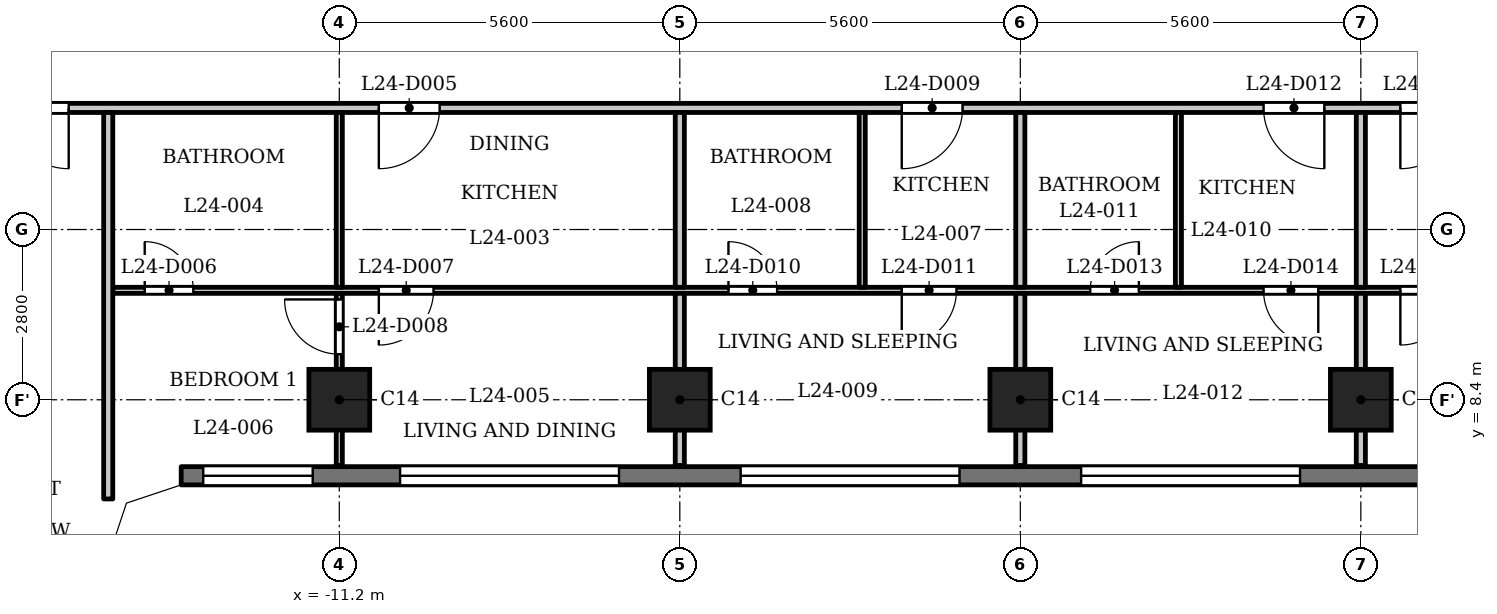
"""IFC4 building model, lengths in metres.
Left out: names, types, materials, properties, quantities, classifications, styles, units other than length and angle.
Written with IfcOpenShell. Run it as: python <this file> out.ifc"""

import sys

from ifc_helpers import new_model, si_unit, direction, frame, frame_2d, origin, origin_2d, place, context, subcontext, project, spatial, polyline, rectangle, outline, extrude, element, fill, save


model = new_model("IFC4")
c1 = context("Model", 3, precision=1e-05, world=origin(), true_north=direction((0.0, 1.0)))
c2 = subcontext(c1, "Body", "Model", "MODEL_VIEW")
j1 = project(units=[si_unit("LENGTHUNIT", "METRE"), si_unit("PLANEANGLEUNIT", "RADIAN")], contexts=[c1])
p1 = place(None, origin())
s1 = spatial("IfcSite", under=j1, at=p1, CompositionType="ELEMENT")
p2 = place(p1, origin())
s2 = spatial("IfcBuilding", under=s1, at=p2, CompositionType="ELEMENT")
p3 = place(p2, frame((0.0, 0.0, 97.3)))
s3 = spatial("IfcBuildingStorey", under=s2, at=p3, CompositionType="ELEMENT", Elevation=97.3)
for number, where, z_axis, x_axis in (
    (1, (-11.2, 8.4, 0.0), (0.0, 0.0, 1.0), (1.0, 0.0, 0.0)),
    (2, (-5.6, 8.4, 0.0), (0.0, 0.0, 1.0), (1.0, 0.0, 0.0)),
    (3, (0.0, 8.4, 0.0), (0.0, 0.0, 1.0), (1.0, 0.0, 0.0)),
    (4, (5.6, 8.4, 0.0), (0.0, 0.0, 1.0), (1.0, 0.0, 0.0)),
):
    element("IfcColumn", number, at=place(p3, frame(where, z_axis=z_axis, x_axis=x_axis)), inside=s3, PredefinedType="COLUMN", context=c2, shape_type="SweptSolid", body=[
        extrude(rectangle(XDim=1.0, YDim=1.0, at=origin_2d()), origin(), (0.0, 0.0, 1.0), 3.5),
    ])
p4 = place(p3, frame((-13.8, 7.15, 0.0), z_axis=(0.0, 0.0, 1.0), x_axis=(1.0, 0.0, 0.0)))
e5 = element("IfcWall", 5, at=p4, inside=s3, PredefinedType="SOLIDWALL", context=c2, shape_type="SweptSolid", body=[
    extrude(rectangle(XDim=27.6, YDim=0.3, at=frame_2d((13.8, 0.0))), origin(), (0.0, 0.0, 1.0), 3.2),
])
p5 = place(p4, frame((0.363, 0.0, 0.9)))
e6 = element("IfcOpeningElement", 6, at=p5, cuts=e5, PredefinedType="OPENING", context=c2, shape_type="SweptSolid", body=[
    extrude(rectangle(XDim=1.8, YDim=1.25, at=frame_2d((0.9, 0.625))), frame((0.0, 0.16, 0.0), z_axis=(0.0, -1.0, 0.0), x_axis=(1.0, 0.0, 0.0)), (0.0, 0.0, 1.0), 0.32),
])
p6 = place(p4, frame((3.6, 0.0, 1.2)))
e7 = element("IfcOpeningElement", 7, at=p6, cuts=e5, PredefinedType="OPENING", context=c2, shape_type="SweptSolid", body=[
    extrude(rectangle(XDim=3.6, YDim=0.95, at=frame_2d((1.8, 0.475))), frame((0.0, 0.16, 0.0), z_axis=(0.0, -1.0, 0.0), x_axis=(1.0, 0.0, 0.0)), (0.0, 0.0, 1.0), 0.32),
])
p7 = place(p4, frame((9.2, 0.0, 1.2)))
e8 = element("IfcOpeningElement", 8, at=p7, cuts=e5, PredefinedType="OPENING", context=c2, shape_type="SweptSolid", body=[
    extrude(rectangle(XDim=3.6, YDim=0.95, at=frame_2d((1.8, 0.475))), frame((0.0, 0.16, 0.0), z_axis=(0.0, -1.0, 0.0), x_axis=(1.0, 0.0, 0.0)), (0.0, 0.0, 1.0), 0.32),
])
p8 = place(p4, frame((14.8, 0.0, 1.2)))
e9 = element("IfcOpeningElement", 9, at=p8, cuts=e5, PredefinedType="OPENING", context=c2, shape_type="SweptSolid", body=[
    extrude(rectangle(XDim=3.6, YDim=0.95, at=frame_2d((1.8, 0.475))), frame((0.0, 0.16, 0.0), z_axis=(0.0, -1.0, 0.0), x_axis=(1.0, 0.0, 0.0)), (0.0, 0.0, 1.0), 0.32),
])
p9 = place(p4, frame((20.4, 0.0, 1.2)))
e10 = element("IfcOpeningElement", 10, at=p9, cuts=e5, PredefinedType="OPENING", context=c2, shape_type="SweptSolid", body=[
    extrude(rectangle(XDim=3.6, YDim=0.95, at=frame_2d((1.8, 0.475))), frame((0.0, 0.16, 0.0), z_axis=(0.0, -1.0, 0.0), x_axis=(1.0, 0.0, 0.0)), (0.0, 0.0, 1.0), 0.32),
])
p10 = place(p4, frame((25.438, 0.0, 0.9)))
e11 = element("IfcOpeningElement", 11, at=p10, cuts=e5, PredefinedType="OPENING", context=c2, shape_type="SweptSolid", body=[
    extrude(rectangle(XDim=1.8, YDim=1.25, at=frame_2d((0.9, 0.625))), frame((0.0, 0.16, 0.0), z_axis=(0.0, -1.0, 0.0), x_axis=(1.0, 0.0, 0.0)), (0.0, 0.0, 1.0), 0.32),
])
p11 = place(p3, frame((-14.925, 10.2, 0.0), z_axis=(0.0, 0.0, 1.0), x_axis=(1.0, 0.0, 0.0)))
e12 = element("IfcWall", 12, at=p11, inside=s3, PredefinedType="PARTITIONING", context=c2, shape_type="SweptSolid", body=[
    extrude(rectangle(XDim=29.85, YDim=0.1, at=frame_2d((14.925, 0.0))), origin(), (0.0, 0.0, 1.0), 3.2),
])
p12 = place(p11, frame((0.525, 0.0, 0.0)))
e13 = element("IfcOpeningElement", 13, at=p12, cuts=e12, PredefinedType="OPENING", context=c2, shape_type="SweptSolid", body=[
    extrude(rectangle(XDim=0.8, YDim=2.1, at=frame_2d((0.4, 1.05))), frame((0.0, 0.06, 0.0), z_axis=(0.0, -1.0, 0.0), x_axis=(1.0, 0.0, 0.0)), (0.0, 0.0, 1.0), 0.12),
])
p13 = place(p11, frame((4.375, 0.0, 0.0)))
e14 = element("IfcOpeningElement", 14, at=p13, cuts=e12, PredefinedType="OPENING", context=c2, shape_type="SweptSolid", body=[
    extrude(rectangle(XDim=0.9, YDim=2.1, at=frame_2d((0.45, 1.05))), frame((0.0, 0.06, 0.0), z_axis=(0.0, -1.0, 0.0), x_axis=(1.0, 0.0, 0.0)), (0.0, 0.0, 1.0), 0.12),
])
p14 = place(p11, frame((10.125, 0.0, 0.0)))
e15 = element("IfcOpeningElement", 15, at=p14, cuts=e12, PredefinedType="OPENING", context=c2, shape_type="SweptSolid", body=[
    extrude(rectangle(XDim=0.8, YDim=2.1, at=frame_2d((0.4, 1.05))), frame((0.0, 0.06, 0.0), z_axis=(0.0, -1.0, 0.0), x_axis=(1.0, 0.0, 0.0)), (0.0, 0.0, 1.0), 0.12),
])
p15 = place(p11, frame((12.975, 0.0, 0.0)))
e16 = element("IfcOpeningElement", 16, at=p15, cuts=e12, PredefinedType="OPENING", context=c2, shape_type="SweptSolid", body=[
    extrude(rectangle(XDim=0.9, YDim=2.1, at=frame_2d((0.45, 1.05))), frame((0.0, 0.06, 0.0), z_axis=(0.0, -1.0, 0.0), x_axis=(1.0, 0.0, 0.0)), (0.0, 0.0, 1.0), 0.12),
])
p16 = place(p11, frame((16.075, 0.0, 0.0)))
e17 = element("IfcOpeningElement", 17, at=p16, cuts=e12, PredefinedType="OPENING", context=c2, shape_type="SweptSolid", body=[
    extrude(rectangle(XDim=0.8, YDim=2.1, at=frame_2d((0.4, 1.05))), frame((0.0, 0.06, 0.0), z_axis=(0.0, -1.0, 0.0), x_axis=(1.0, 0.0, 0.0)), (0.0, 0.0, 1.0), 0.12),
])
p17 = place(p11, frame((18.925, 0.0, 0.0)))
e18 = element("IfcOpeningElement", 18, at=p17, cuts=e12, PredefinedType="OPENING", context=c2, shape_type="SweptSolid", body=[
    extrude(rectangle(XDim=0.9, YDim=2.1, at=frame_2d((0.45, 1.05))), frame((0.0, 0.06, 0.0), z_axis=(0.0, -1.0, 0.0), x_axis=(1.0, 0.0, 0.0)), (0.0, 0.0, 1.0), 0.12),
])
p18 = place(p11, frame((26.975, 0.0, 0.0)))
e19 = element("IfcOpeningElement", 19, at=p18, cuts=e12, PredefinedType="OPENING", context=c2, shape_type="SweptSolid", body=[
    extrude(rectangle(XDim=0.8, YDim=2.1, at=frame_2d((0.4, 1.05))), frame((0.0, 0.06, 0.0), z_axis=(0.0, -1.0, 0.0), x_axis=(1.0, 0.0, 0.0)), (0.0, 0.0, 1.0), 0.12),
])
p19 = place(p11, frame((21.175, 0.0, 0.0)))
e20 = element("IfcOpeningElement", 20, at=p19, cuts=e12, PredefinedType="OPENING", context=c2, shape_type="SweptSolid", body=[
    extrude(rectangle(XDim=0.9, YDim=2.1, at=frame_2d((0.45, 1.05))), frame((0.0, 0.06, 0.0), z_axis=(0.0, -1.0, 0.0), x_axis=(1.0, 0.0, 0.0)), (0.0, 0.0, 1.0), 0.12),
])
p20 = place(p3, frame((-17.4, 13.2, 0.0), z_axis=(0.0, 0.0, 1.0), x_axis=(1.0, 0.0, 0.0)))
e21 = element("IfcWall", 21, at=p20, inside=s3, PredefinedType="PARTITIONING", context=c2, shape_type="SweptSolid", body=[
    extrude(rectangle(XDim=34.8, YDim=0.15, at=frame_2d((17.4, 0.0))), origin(), (0.0, 0.0, 1.0), 3.2),
])
p21 = place(p20, frame((0.75, 0.0, 0.0)))
e22 = element("IfcOpeningElement", 22, at=p21, cuts=e21, PredefinedType="OPENING", context=c2, shape_type="SweptSolid", body=[
    extrude(rectangle(XDim=1.0, YDim=2.1, at=frame_2d((0.5, 1.05))), frame((0.0, 0.085, 0.0), z_axis=(0.0, -1.0, 0.0), x_axis=(1.0, 0.0, 0.0)), (0.0, 0.0, 1.0), 0.17),
])
p22 = place(p20, frame((33.15, 0.0, 0.0)))
e23 = element("IfcOpeningElement", 23, at=p22, cuts=e21, PredefinedType="OPENING", context=c2, shape_type="SweptSolid", body=[
    extrude(rectangle(XDim=1.0, YDim=2.1, at=frame_2d((0.5, 1.05))), frame((0.0, 0.085, 0.0), z_axis=(0.0, -1.0, 0.0), x_axis=(1.0, 0.0, 0.0)), (0.0, 0.0, 1.0), 0.17),
])
p23 = place(p20, frame((6.85, 0.0, 0.0)))
e24 = element("IfcOpeningElement", 24, at=p23, cuts=e21, PredefinedType="OPENING", context=c2, shape_type="SweptSolid", body=[
    extrude(rectangle(XDim=1.0, YDim=2.1, at=frame_2d((0.5, 1.05))), frame((0.0, 0.085, 0.0), z_axis=(0.0, -1.0, 0.0), x_axis=(1.0, 0.0, 0.0)), (0.0, 0.0, 1.0), 0.17),
])
p24 = place(p20, frame((15.45, 0.0, 0.0)))
e25 = element("IfcOpeningElement", 25, at=p24, cuts=e21, PredefinedType="OPENING", context=c2, shape_type="SweptSolid", body=[
    extrude(rectangle(XDim=1.0, YDim=2.1, at=frame_2d((0.5, 1.05))), frame((0.0, 0.085, 0.0), z_axis=(0.0, -1.0, 0.0), x_axis=(1.0, 0.0, 0.0)), (0.0, 0.0, 1.0), 0.17),
])
p25 = place(p20, frame((21.4, 0.0, 0.0)))
e26 = element("IfcOpeningElement", 26, at=p25, cuts=e21, PredefinedType="OPENING", context=c2, shape_type="SweptSolid", body=[
    extrude(rectangle(XDim=1.0, YDim=2.1, at=frame_2d((0.5, 1.05))), frame((0.0, 0.085, 0.0), z_axis=(0.0, -1.0, 0.0), x_axis=(1.0, 0.0, 0.0)), (0.0, 0.0, 1.0), 0.17),
])
p26 = place(p20, frame((23.65, 0.0, 0.0)))
e27 = element("IfcOpeningElement", 27, at=p26, cuts=e21, PredefinedType="OPENING", context=c2, shape_type="SweptSolid", body=[
    extrude(rectangle(XDim=1.0, YDim=2.1, at=frame_2d((0.5, 1.05))), frame((0.0, 0.085, 0.0), z_axis=(0.0, -1.0, 0.0), x_axis=(1.0, 0.0, 0.0)), (0.0, 0.0, 1.0), 0.17),
])
p27 = place(p3, frame((-15.0, 6.769, 0.0), z_axis=(0.0, 0.0, 1.0), x_axis=(0.0, 1.0, 0.0)))
e28 = element("IfcWall", 28, at=p27, inside=s3, PredefinedType="PARTITIONING", context=c2, shape_type="SweptSolid", body=[
    extrude(rectangle(XDim=6.356, YDim=0.15, at=frame_2d((3.178, 0.0))), origin(), (0.0, 0.0, 1.0), 3.2),
])
p28 = place(p3, frame((-11.2, 7.32, 0.0), z_axis=(0.0, 0.0, 1.0), x_axis=(0.0, 1.0, 0.0)))
e29 = element("IfcWall", 29, at=p28, inside=s3, PredefinedType="PARTITIONING", context=c2, shape_type="SweptSolid", body=[
    extrude(rectangle(XDim=2.83, YDim=0.1, at=frame_2d((1.415, 0.0))), origin(), (0.0, 0.0, 1.0), 3.2),
])
p29 = place(p28, frame((1.83, 0.0, 0.0)))
e30 = element("IfcOpeningElement", 30, at=p29, cuts=e29, PredefinedType="OPENING", context=c2, shape_type="SweptSolid", body=[
    extrude(rectangle(XDim=0.9, YDim=2.1, at=frame_2d((0.45, 1.05))), frame((0.0, 0.06, 0.0), z_axis=(0.0, -1.0, 0.0), x_axis=(1.0, 0.0, 0.0)), (0.0, 0.0, 1.0), 0.12),
])
p30 = place(p3, frame((-11.2, 10.25, 0.0), z_axis=(0.0, 0.0, 1.0), x_axis=(0.0, 1.0, 0.0)))
e31 = element("IfcWall", 31, at=p30, inside=s3, PredefinedType="PARTITIONING", context=c2, shape_type="SweptSolid", body=[
    extrude(rectangle(XDim=2.875, YDim=0.1, at=frame_2d((1.438, 0.0))), origin(), (0.0, 0.0, 1.0), 3.2),
])
p31 = place(p3, frame((-5.6, 7.32, 0.0), z_axis=(0.0, 0.0, 1.0), x_axis=(0.0, 1.0, 0.0)))
e32 = element("IfcWall", 32, at=p31, inside=s3, PredefinedType="PARTITIONING", context=c2, shape_type="SweptSolid", body=[
    extrude(rectangle(XDim=2.83, YDim=0.15, at=frame_2d((1.415, 0.0))), origin(), (0.0, 0.0, 1.0), 3.2),
])
p32 = place(p3, frame((-5.6, 10.25, 0.0), z_axis=(0.0, 0.0, 1.0), x_axis=(0.0, 1.0, 0.0)))
e33 = element("IfcWall", 33, at=p32, inside=s3, PredefinedType="PARTITIONING", context=c2, shape_type="SweptSolid", body=[
    extrude(rectangle(XDim=2.875, YDim=0.15, at=frame_2d((1.438, 0.0))), origin(), (0.0, 0.0, 1.0), 3.2),
])
p33 = place(p3, frame((-2.6, 10.25, 0.0), z_axis=(0.0, 0.0, 1.0), x_axis=(0.0, 1.0, 0.0)))
e34 = element("IfcWall", 34, at=p33, inside=s3, PredefinedType="PARTITIONING", context=c2, shape_type="SweptSolid", body=[
    extrude(rectangle(XDim=2.875, YDim=0.1, at=frame_2d((1.438, 0.0))), origin(), (0.0, 0.0, 1.0), 3.2),
])
p34 = place(p3, frame((0.0, 7.32, 0.0), z_axis=(0.0, 0.0, 1.0), x_axis=(0.0, 1.0, 0.0)))
e35 = element("IfcWall", 35, at=p34, inside=s3, PredefinedType="PARTITIONING", context=c2, shape_type="SweptSolid", body=[
    extrude(rectangle(XDim=2.83, YDim=0.15, at=frame_2d((1.415, 0.0))), origin(), (0.0, 0.0, 1.0), 3.2),
])
p35 = place(p3, frame((0.0, 10.25, 0.0), z_axis=(0.0, 0.0, 1.0), x_axis=(0.0, 1.0, 0.0)))
e36 = element("IfcWall", 36, at=p35, inside=s3, PredefinedType="PARTITIONING", context=c2, shape_type="SweptSolid", body=[
    extrude(rectangle(XDim=2.875, YDim=0.15, at=frame_2d((1.438, 0.0))), origin(), (0.0, 0.0, 1.0), 3.2),
])
p36 = place(p3, frame((2.6, 10.25, 0.0), z_axis=(0.0, 0.0, 1.0), x_axis=(0.0, 1.0, 0.0)))
e37 = element("IfcWall", 37, at=p36, inside=s3, PredefinedType="PARTITIONING", context=c2, shape_type="SweptSolid", body=[
    extrude(rectangle(XDim=2.875, YDim=0.1, at=frame_2d((1.438, 0.0))), origin(), (0.0, 0.0, 1.0), 3.2),
])
p37 = place(p3, frame((5.6, 7.32, 0.0), z_axis=(0.0, 0.0, 1.0), x_axis=(0.0, 1.0, 0.0)))
e38 = element("IfcWall", 38, at=p37, inside=s3, PredefinedType="PARTITIONING", context=c2, shape_type="SweptSolid", body=[
    extrude(rectangle(XDim=2.83, YDim=0.15, at=frame_2d((1.415, 0.0))), origin(), (0.0, 0.0, 1.0), 3.2),
])
p38 = place(p3, frame((5.6, 10.25, 0.0), z_axis=(0.0, 0.0, 1.0), x_axis=(0.0, 1.0, 0.0)))
e39 = element("IfcWall", 39, at=p38, inside=s3, PredefinedType="PARTITIONING", context=c2, shape_type="SweptSolid", body=[
    extrude(rectangle(XDim=2.875, YDim=0.15, at=frame_2d((1.438, 0.0))), origin(), (0.0, 0.0, 1.0), 3.2),
])
p39 = place(p3, origin())
e40 = element("IfcWall", 40, at=p39, inside=s3, PredefinedType="SOLIDWALL", context=c2, shape_type="SweptSolid", body=[
    extrude(outline(polyline([(-13.849, 7.3), (-14.937, 6.937), (-15.3, 5.849), (-15.3, 5.8), (-15.0, 5.8), (-14.7, 6.7), (-13.8, 7.0), (-13.8, 7.3), (-13.849, 7.3)])), origin(), (0.0, 0.0, 1.0), 3.2),
])
p40 = place(p21, origin())
e41 = element("IfcDoor", 41, at=p40, inside=s3, OperationType="SINGLE_SWING_RIGHT", PredefinedType="DOOR", context=c2, shape_type="SweptSolid", body=[
    extrude(rectangle(XDim=1.0, YDim=2.1, at=frame_2d((0.5, 1.05))), frame((0.0, 0.025, 0.0), z_axis=(0.0, -1.0, 0.0), x_axis=(1.0, 0.0, 0.0)), (0.0, 0.0, 1.0), 0.05),
])
fill(e22, e41)
p41 = place(p23, origin())
e42 = element("IfcDoor", 42, at=p41, inside=s3, OperationType="SINGLE_SWING_LEFT", PredefinedType="DOOR", context=c2, shape_type="SweptSolid", body=[
    extrude(rectangle(XDim=1.0, YDim=2.1, at=frame_2d((0.5, 1.05))), frame((0.0, 0.025, 0.0), z_axis=(0.0, -1.0, 0.0), x_axis=(1.0, 0.0, 0.0)), (0.0, 0.0, 1.0), 0.05),
])
fill(e24, e42)
p42 = place(p12, origin())
e43 = element("IfcDoor", 43, at=p42, inside=s3, OperationType="SINGLE_SWING_RIGHT", PredefinedType="DOOR", context=c2, shape_type="SweptSolid", body=[
    extrude(rectangle(XDim=0.8, YDim=2.1, at=frame_2d((0.4, 1.05))), frame((0.0, 0.025, 0.0), z_axis=(0.0, -1.0, 0.0), x_axis=(1.0, 0.0, 0.0)), (0.0, 0.0, 1.0), 0.05),
])
fill(e13, e43)
p43 = place(p13, origin())
e44 = element("IfcDoor", 44, at=p43, inside=s3, OperationType="SINGLE_SWING_LEFT", PredefinedType="DOOR", context=c2, shape_type="SweptSolid", body=[
    extrude(rectangle(XDim=0.9, YDim=2.1, at=frame_2d((0.45, 1.05))), frame((0.0, 0.025, 0.0), z_axis=(0.0, -1.0, 0.0), x_axis=(1.0, 0.0, 0.0)), (0.0, 0.0, 1.0), 0.05),
])
fill(e14, e44)
p44 = place(p29, origin())
e45 = element("IfcDoor", 45, at=p44, inside=s3, OperationType="SINGLE_SWING_LEFT", PredefinedType="DOOR", context=c2, shape_type="SweptSolid", body=[
    extrude(rectangle(XDim=0.9, YDim=2.1, at=frame_2d((0.45, 1.05))), frame((0.0, 0.025, 0.0), z_axis=(0.0, -1.0, 0.0), x_axis=(1.0, 0.0, 0.0)), (0.0, 0.0, 1.0), 0.05),
])
fill(e30, e45)
p45 = place(p24, origin())
e46 = element("IfcDoor", 46, at=p45, inside=s3, OperationType="SINGLE_SWING_LEFT", PredefinedType="DOOR", context=c2, shape_type="SweptSolid", body=[
    extrude(rectangle(XDim=1.0, YDim=2.1, at=frame_2d((0.5, 1.05))), frame((0.0, 0.025, 0.0), z_axis=(0.0, -1.0, 0.0), x_axis=(1.0, 0.0, 0.0)), (0.0, 0.0, 1.0), 0.05),
])
fill(e25, e46)
p46 = place(p14, origin())
e47 = element("IfcDoor", 47, at=p46, inside=s3, OperationType="SINGLE_SWING_RIGHT", PredefinedType="DOOR", context=c2, shape_type="SweptSolid", body=[
    extrude(rectangle(XDim=0.8, YDim=2.1, at=frame_2d((0.4, 1.05))), frame((0.0, 0.025, 0.0), z_axis=(0.0, -1.0, 0.0), x_axis=(1.0, 0.0, 0.0)), (0.0, 0.0, 1.0), 0.05),
])
fill(e15, e47)
p47 = place(p15, origin())
e48 = element("IfcDoor", 48, at=p47, inside=s3, OperationType="SINGLE_SWING_LEFT", PredefinedType="DOOR", context=c2, shape_type="SweptSolid", body=[
    extrude(rectangle(XDim=0.9, YDim=2.1, at=frame_2d((0.45, 1.05))), frame((0.0, 0.025, 0.0), z_axis=(0.0, -1.0, 0.0), x_axis=(1.0, 0.0, 0.0)), (0.0, 0.0, 1.0), 0.05),
])
fill(e16, e48)
p48 = place(p25, origin())
e49 = element("IfcDoor", 49, at=p48, inside=s3, OperationType="SINGLE_SWING_RIGHT", PredefinedType="DOOR", context=c2, shape_type="SweptSolid", body=[
    extrude(rectangle(XDim=1.0, YDim=2.1, at=frame_2d((0.5, 1.05))), frame((0.0, 0.025, 0.0), z_axis=(0.0, -1.0, 0.0), x_axis=(1.0, 0.0, 0.0)), (0.0, 0.0, 1.0), 0.05),
])
fill(e26, e49)
p49 = place(p16, origin())
e50 = element("IfcDoor", 50, at=p49, inside=s3, OperationType="SINGLE_SWING_LEFT", PredefinedType="DOOR", context=c2, shape_type="SweptSolid", body=[
    extrude(rectangle(XDim=0.8, YDim=2.1, at=frame_2d((0.4, 1.05))), frame((0.0, 0.025, 0.0), z_axis=(0.0, -1.0, 0.0), x_axis=(1.0, 0.0, 0.0)), (0.0, 0.0, 1.0), 0.05),
])
fill(e17, e50)
p50 = place(p17, origin())
e51 = element("IfcDoor", 51, at=p50, inside=s3, OperationType="SINGLE_SWING_RIGHT", PredefinedType="DOOR", context=c2, shape_type="SweptSolid", body=[
    extrude(rectangle(XDim=0.9, YDim=2.1, at=frame_2d((0.45, 1.05))), frame((0.0, 0.025, 0.0), z_axis=(0.0, -1.0, 0.0), x_axis=(1.0, 0.0, 0.0)), (0.0, 0.0, 1.0), 0.05),
])
fill(e18, e51)
p51 = place(p26, origin())
e52 = element("IfcDoor", 52, at=p51, inside=s3, OperationType="SINGLE_SWING_LEFT", PredefinedType="DOOR", context=c2, shape_type="SweptSolid", body=[
    extrude(rectangle(XDim=1.0, YDim=2.1, at=frame_2d((0.5, 1.05))), frame((0.0, 0.025, 0.0), z_axis=(0.0, -1.0, 0.0), x_axis=(1.0, 0.0, 0.0)), (0.0, 0.0, 1.0), 0.05),
])
fill(e27, e52)
p52 = place(p19, origin())
e53 = element("IfcDoor", 53, at=p52, inside=s3, OperationType="SINGLE_SWING_LEFT", PredefinedType="DOOR", context=c2, shape_type="SweptSolid", body=[
    extrude(rectangle(XDim=0.9, YDim=2.1, at=frame_2d((0.45, 1.05))), frame((0.0, 0.025, 0.0), z_axis=(0.0, -1.0, 0.0), x_axis=(1.0, 0.0, 0.0)), (0.0, 0.0, 1.0), 0.05),
])
fill(e20, e53)
p53 = place(p5, origin())
e54 = element("IfcWindow", 54, at=p53, inside=s3, PartitioningType="SINGLE_PANEL", PredefinedType="WINDOW", context=c2, shape_type="SweptSolid", body=[
    extrude(rectangle(XDim=1.8, YDim=1.25, at=frame_2d((0.9, 0.625))), frame((0.0, 0.03, 0.0), z_axis=(0.0, -1.0, 0.0), x_axis=(1.0, 0.0, 0.0)), (0.0, 0.0, 1.0), 0.06),
])
fill(e6, e54)
p54 = place(p6, origin())
e55 = element("IfcWindow", 55, at=p54, inside=s3, PartitioningType="SINGLE_PANEL", PredefinedType="WINDOW", context=c2, shape_type="SweptSolid", body=[
    extrude(rectangle(XDim=3.6, YDim=0.95, at=frame_2d((1.8, 0.475))), frame((0.0, 0.03, 0.0), z_axis=(0.0, -1.0, 0.0), x_axis=(1.0, 0.0, 0.0)), (0.0, 0.0, 1.0), 0.06),
])
fill(e7, e55)
p55 = place(p7, origin())
e56 = element("IfcWindow", 56, at=p55, inside=s3, PartitioningType="SINGLE_PANEL", PredefinedType="WINDOW", context=c2, shape_type="SweptSolid", body=[
    extrude(rectangle(XDim=3.6, YDim=0.95, at=frame_2d((1.8, 0.475))), frame((0.0, 0.03, 0.0), z_axis=(0.0, -1.0, 0.0), x_axis=(1.0, 0.0, 0.0)), (0.0, 0.0, 1.0), 0.06),
])
fill(e8, e56)
p56 = place(p8, origin())
e57 = element("IfcWindow", 57, at=p56, inside=s3, PartitioningType="SINGLE_PANEL", PredefinedType="WINDOW", context=c2, shape_type="SweptSolid", body=[
    extrude(rectangle(XDim=3.6, YDim=0.95, at=frame_2d((1.8, 0.475))), frame((0.0, 0.03, 0.0), z_axis=(0.0, -1.0, 0.0), x_axis=(1.0, 0.0, 0.0)), (0.0, 0.0, 1.0), 0.06),
])
fill(e9, e57)
save(model, sys.argv[1])
